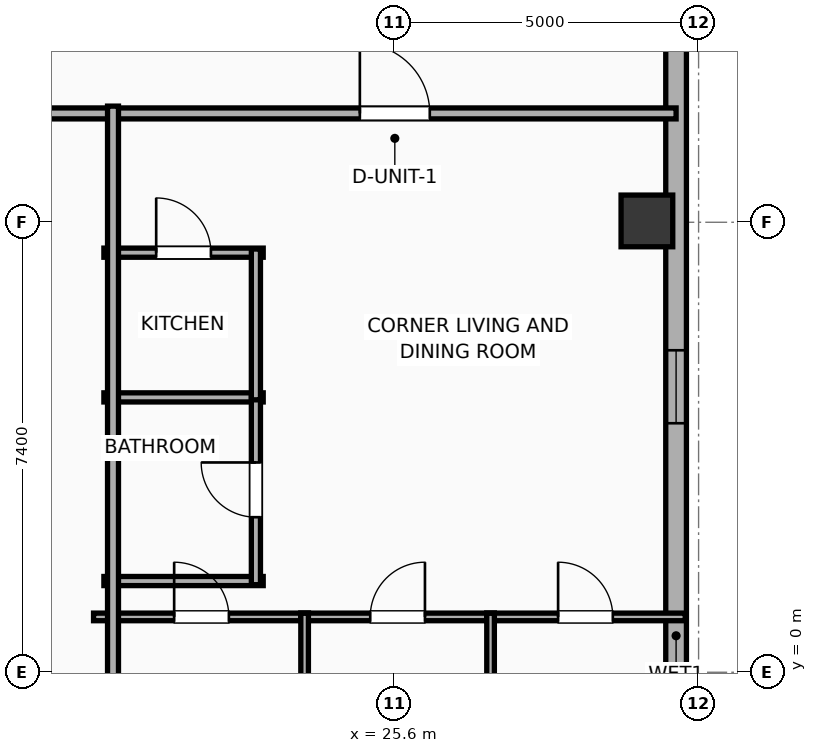
"""IFC4 building model, lengths in metres.
Left out: names, types, materials, properties, quantities, classifications, styles, units other than length and angle.
Written with IfcOpenShell. Run it as: python <this file> out.ifc"""

import sys

from ifc_helpers import new_model, si_unit, direction, frame, frame_2d, origin, origin_2d, place, context, subcontext, project, spatial, rectangle, hollow_rectangle, extrude, element, fill, save


model = new_model("IFC4")
c1 = context("Model", 3, precision=1e-05, world=origin(), true_north=direction((0.0, 1.0)))
c2 = subcontext(c1, "Body", "Model", "MODEL_VIEW")
j1 = project(units=[si_unit("LENGTHUNIT", "METRE"), si_unit("PLANEANGLEUNIT", "RADIAN")], contexts=[c1])
p1 = place(None, origin())
s1 = spatial("IfcSite", under=j1, at=p1, CompositionType="ELEMENT")
p2 = place(p1, origin())
s2 = spatial("IfcBuilding", under=s1, at=p2, CompositionType="ELEMENT")
p3 = place(p2, frame((0.0, 0.0, 223.6)))
s3 = spatial("IfcBuildingStorey", under=s2, at=p3, CompositionType="ELEMENT", Elevation=223.6)
p4 = place(p3, frame((29.75, 7.422, 0.0), z_axis=(0.0, 0.0, 1.0), x_axis=(1.0, 0.0, 0.0)))
e1 = element("IfcColumn", 1, at=p4, inside=s3, PredefinedType="COLUMN", context=c2, shape_type="SweptSolid", body=[
    extrude(hollow_rectangle(XDim=0.85, YDim=0.85, WallThickness=0.028, at=origin_2d()), origin(), (0.0, 0.0, 1.0), 3.9),
])
p5 = place(p3, frame((30.23, 16.583, 0.0), z_axis=(0.0, 0.0, 1.0), x_axis=(0.0, -1.0, 0.0)))
e2 = element("IfcWall", 2, at=p5, inside=s3, PredefinedType="ELEMENTEDWALL", context=c2, shape_type="SweptSolid", body=[
    extrude(rectangle(XDim=31.967, YDim=0.34, at=frame_2d((15.983, 0.0))), origin(), (0.0, 0.0, 1.0), 3.65),
])
p6 = place(p5, frame((30.132, 0.0, 0.75)))
e3 = element("IfcOpeningElement", 3, at=p6, cuts=e2, PredefinedType="OPENING", context=c2, shape_type="SweptSolid", body=[
    extrude(rectangle(XDim=1.2, YDim=2.05, at=frame_2d((0.6, 1.025))), frame((0.0, 0.18, 0.0), z_axis=(0.0, -1.0, 0.0), x_axis=(1.0, 0.0, 0.0)), (0.0, 0.0, 1.0), 0.36),
])
p7 = place(p5, frame((11.288, 0.0, 0.75)))
e4 = element("IfcOpeningElement", 4, at=p7, cuts=e2, PredefinedType="OPENING", context=c2, shape_type="SweptSolid", body=[
    extrude(rectangle(XDim=1.2, YDim=2.05, at=frame_2d((0.6, 1.025))), frame((0.0, 0.18, 0.0), z_axis=(0.0, -1.0, 0.0), x_axis=(1.0, 0.0, 0.0)), (0.0, 0.0, 1.0), 0.36),
])
p8 = place(p5, frame((20.538, 0.0, 0.75)))
e5 = element("IfcOpeningElement", 5, at=p8, cuts=e2, PredefinedType="OPENING", context=c2, shape_type="SweptSolid", body=[
    extrude(rectangle(XDim=1.2, YDim=2.05, at=frame_2d((0.6, 1.025))), frame((0.0, 0.18, 0.0), z_axis=(0.0, -1.0, 0.0), x_axis=(1.0, 0.0, 0.0)), (0.0, 0.0, 1.0), 0.36),
])
p9 = place(p3, frame((9.88, 9.19, 0.0), z_axis=(0.0, 0.0, 1.0), x_axis=(1.0, 0.0, 0.0)))
e6 = element("IfcWall", 6, at=p9, inside=s3, PredefinedType="PARTITIONING", context=c2, shape_type="SweptSolid", body=[
    extrude(rectangle(XDim=20.35, YDim=0.18, at=frame_2d((10.175, 0.0))), origin(), (0.0, 0.0, 1.0), 3.65),
])
p10 = place(p9, frame((15.149, 0.0, 0.0)))
e7 = element("IfcOpeningElement", 7, at=p10, cuts=e6, PredefinedType="OPENING", context=c2, shape_type="SweptSolid", body=[
    extrude(rectangle(XDim=1.15, YDim=2.05, at=frame_2d((0.575, 1.025))), frame((0.0, 0.1, 0.0), z_axis=(0.0, -1.0, 0.0), x_axis=(1.0, 0.0, 0.0)), (0.0, 0.0, 1.0), 0.2),
])
p11 = place(p3, frame((20.82, 6.9, 0.0), z_axis=(0.0, 0.0, 1.0), x_axis=(1.0, 0.0, 0.0)))
e8 = element("IfcWall", 8, at=p11, inside=s3, PredefinedType="PLUMBINGWALL", context=c2, shape_type="SweptSolid", body=[
    extrude(rectangle(XDim=2.62, YDim=0.15, at=frame_2d((1.31, 0.0))), origin(), (0.0, 0.0, 1.0), 3.65),
])
p12 = place(p11, frame((0.86, 0.0, 0.0)))
e9 = element("IfcOpeningElement", 9, at=p12, cuts=e8, PredefinedType="OPENING", context=c2, shape_type="SweptSolid", body=[
    extrude(rectangle(XDim=0.9, YDim=2.05, at=frame_2d((0.45, 1.025))), frame((0.0, 0.085, 0.0), z_axis=(0.0, -1.0, 0.0), x_axis=(1.0, 0.0, 0.0)), (0.0, 0.0, 1.0), 0.17),
])
for number, where, z_axis, x_axis in (
    (10, (20.82, 4.52, 0.0), (0.0, 0.0, 1.0), (1.0, 0.0, 0.0)),
    (11, (20.82, 1.5, 0.0), (0.0, 0.0, 1.0), (1.0, 0.0, 0.0)),
):
    element("IfcWall", number, at=place(p3, frame(where, z_axis=z_axis, x_axis=x_axis)), inside=s3, PredefinedType="PLUMBINGWALL", context=c2, shape_type="SweptSolid", body=[
        extrude(rectangle(XDim=2.62, YDim=0.15, at=frame_2d((1.31, 0.0))), origin(), (0.0, 0.0, 1.0), 3.65),
    ])
p13 = place(p3, frame((23.32, 1.44, 0.0), z_axis=(0.0, 0.0, 1.0), x_axis=(0.0, 1.0, 0.0)))
e12 = element("IfcWall", 12, at=p13, inside=s3, PredefinedType="PLUMBINGWALL", context=c2, shape_type="SweptSolid", body=[
    extrude(rectangle(XDim=3.12, YDim=0.15, at=frame_2d((1.56, 0.0))), origin(), (0.0, 0.0, 1.0), 3.65),
])
p14 = place(p13, frame((1.11, 0.0, 0.0)))
e13 = element("IfcOpeningElement", 13, at=p14, cuts=e12, PredefinedType="OPENING", context=c2, shape_type="SweptSolid", body=[
    extrude(rectangle(XDim=0.9, YDim=2.05, at=frame_2d((0.45, 1.025))), frame((0.0, 0.085, 0.0), z_axis=(0.0, -1.0, 0.0), x_axis=(1.0, 0.0, 0.0)), (0.0, 0.0, 1.0), 0.17),
])
p15 = place(p3, frame((23.32, 4.48, 0.0), z_axis=(0.0, 0.0, 1.0), x_axis=(0.0, 1.0, 0.0)))
e14 = element("IfcWall", 14, at=p15, inside=s3, PredefinedType="PLUMBINGWALL", context=c2, shape_type="SweptSolid", body=[
    extrude(rectangle(XDim=2.48, YDim=0.15, at=frame_2d((1.24, 0.0))), origin(), (0.0, 0.0, 1.0), 3.65),
])
p16 = place(p3, frame((20.65, 0.91, 0.0), z_axis=(0.0, 0.0, 1.0), x_axis=(1.0, 0.0, 0.0)))
e15 = element("IfcWall", 15, at=p16, inside=s3, PredefinedType="PARTITIONING", context=c2, shape_type="SweptSolid", body=[
    extrude(rectangle(XDim=3.534, YDim=0.125, at=frame_2d((1.767, 0.0))), origin(), (0.0, 0.0, 1.0), 3.65),
])
p17 = place(p16, frame((1.325, 0.0, 0.0)))
e16 = element("IfcOpeningElement", 16, at=p17, cuts=e15, PredefinedType="OPENING", context=c2, shape_type="SweptSolid", body=[
    extrude(rectangle(XDim=0.9, YDim=2.05, at=frame_2d((0.45, 1.025))), frame((0.0, 0.073, 0.0), z_axis=(0.0, -1.0, 0.0), x_axis=(1.0, 0.0, 0.0)), (0.0, 0.0, 1.0), 0.145),
])
p18 = place(p3, frame((24.059, 0.91, 0.0), z_axis=(0.0, 0.0, 1.0), x_axis=(1.0, 0.0, 0.0)))
e17 = element("IfcWall", 17, at=p18, inside=s3, PredefinedType="PARTITIONING", context=c2, shape_type="SweptSolid", body=[
    extrude(rectangle(XDim=3.183, YDim=0.125, at=frame_2d((1.591, 0.0))), origin(), (0.0, 0.0, 1.0), 3.65),
])
p19 = place(p18, frame((1.142, 0.0, 0.0)))
e18 = element("IfcOpeningElement", 18, at=p19, cuts=e17, PredefinedType="OPENING", context=c2, shape_type="SweptSolid", body=[
    extrude(rectangle(XDim=0.9, YDim=2.05, at=frame_2d((0.45, 1.025))), frame((0.0, 0.073, 0.0), z_axis=(0.0, -1.0, 0.0), x_axis=(1.0, 0.0, 0.0)), (0.0, 0.0, 1.0), 0.145),
])
p20 = place(p3, frame((27.116, 0.91, 0.0), z_axis=(0.0, 0.0, 1.0), x_axis=(1.0, 0.0, 0.0)))
e19 = element("IfcWall", 19, at=p20, inside=s3, PredefinedType="PARTITIONING", context=c2, shape_type="SweptSolid", body=[
    extrude(rectangle(XDim=3.263, YDim=0.125, at=frame_2d((1.632, 0.0))), origin(), (0.0, 0.0, 1.0), 3.65),
])
p21 = place(p20, frame((1.173, 0.0, 0.0)))
e20 = element("IfcOpeningElement", 20, at=p21, cuts=e19, PredefinedType="OPENING", context=c2, shape_type="SweptSolid", body=[
    extrude(rectangle(XDim=0.9, YDim=2.05, at=frame_2d((0.45, 1.025))), frame((0.0, 0.073, 0.0), z_axis=(0.0, -1.0, 0.0), x_axis=(1.0, 0.0, 0.0)), (0.0, 0.0, 1.0), 0.145),
])
for number, where, z_axis, x_axis in (
    (21, (27.179, -9.51, 0.0), (0.0, 0.0, 1.0), (0.0, 1.0, 0.0)),
    (22, (24.121, -9.51, 0.0), (0.0, 0.0, 1.0), (0.0, 1.0, 0.0)),
):
    element("IfcWall", number, at=place(p3, frame(where, z_axis=z_axis, x_axis=x_axis)), inside=s3, PredefinedType="PARTITIONING", context=c2, shape_type="SweptSolid", body=[
        extrude(rectangle(XDim=10.48, YDim=0.125, at=frame_2d((5.24, 0.0))), origin(), (0.0, 0.0, 1.0), 3.65),
    ])
p22 = place(p3, frame((20.97, -9.31, 0.0), z_axis=(0.0, 0.0, 1.0), x_axis=(0.0, 1.0, 0.0)))
e23 = element("IfcWall", 23, at=p22, inside=s3, PredefinedType="PARTITIONING", context=c2, shape_type="SweptSolid", body=[
    extrude(rectangle(XDim=18.62, YDim=0.18, at=frame_2d((9.31, 0.0))), origin(), (0.0, 0.0, 1.0), 3.65),
])
p23 = place(p7, origin())
e24 = element("IfcWindow", 24, at=p23, inside=s3, PartitioningType="SINGLE_PANEL", PredefinedType="WINDOW", context=c2, shape_type="SweptSolid", body=[
    extrude(rectangle(XDim=1.2, YDim=2.05, at=frame_2d((0.6, 1.025))), frame((0.0, 0.03, 0.0), z_axis=(0.0, -1.0, 0.0), x_axis=(1.0, 0.0, 0.0)), (0.0, 0.0, 1.0), 0.06),
])
fill(e4, e24)
p24 = place(p10, origin())
e25 = element("IfcDoor", 25, at=p24, inside=s3, OperationType="SINGLE_SWING_LEFT", PredefinedType="DOOR", context=c2, shape_type="SweptSolid", body=[
    extrude(rectangle(XDim=1.15, YDim=2.05, at=frame_2d((0.575, 1.025))), frame((0.0, 0.025, 0.0), z_axis=(0.0, -1.0, 0.0), x_axis=(1.0, 0.0, 0.0)), (0.0, 0.0, 1.0), 0.05),
])
fill(e7, e25)
p25 = place(p12, origin())
e26 = element("IfcDoor", 26, at=p25, inside=s3, OperationType="SINGLE_SWING_LEFT", PredefinedType="DOOR", context=c2, shape_type="SweptSolid", body=[
    extrude(rectangle(XDim=0.9, YDim=2.05, at=frame_2d((0.45, 1.025))), frame((0.0, 0.025, 0.0), z_axis=(0.0, -1.0, 0.0), x_axis=(1.0, 0.0, 0.0)), (0.0, 0.0, 1.0), 0.05),
])
fill(e9, e26)
p26 = place(p14, origin())
e27 = element("IfcDoor", 27, at=p26, inside=s3, OperationType="SINGLE_SWING_RIGHT", PredefinedType="DOOR", context=c2, shape_type="SweptSolid", body=[
    extrude(rectangle(XDim=0.9, YDim=2.05, at=frame_2d((0.45, 1.025))), frame((0.0, 0.025, 0.0), z_axis=(0.0, -1.0, 0.0), x_axis=(1.0, 0.0, 0.0)), (0.0, 0.0, 1.0), 0.05),
])
fill(e13, e27)
p27 = place(p17, origin())
e28 = element("IfcDoor", 28, at=p27, inside=s3, OperationType="SINGLE_SWING_LEFT", PredefinedType="DOOR", context=c2, shape_type="SweptSolid", body=[
    extrude(rectangle(XDim=0.9, YDim=2.05, at=frame_2d((0.45, 1.025))), frame((0.0, 0.025, 0.0), z_axis=(0.0, -1.0, 0.0), x_axis=(1.0, 0.0, 0.0)), (0.0, 0.0, 1.0), 0.05),
])
fill(e16, e28)
p28 = place(p19, origin())
e29 = element("IfcDoor", 29, at=p28, inside=s3, OperationType="SINGLE_SWING_RIGHT", PredefinedType="DOOR", context=c2, shape_type="SweptSolid", body=[
    extrude(rectangle(XDim=0.9, YDim=2.05, at=frame_2d((0.45, 1.025))), frame((0.0, 0.025, 0.0), z_axis=(0.0, -1.0, 0.0), x_axis=(1.0, 0.0, 0.0)), (0.0, 0.0, 1.0), 0.05),
])
fill(e18, e29)
p29 = place(p21, origin())
e30 = element("IfcDoor", 30, at=p29, inside=s3, OperationType="SINGLE_SWING_LEFT", PredefinedType="DOOR", context=c2, shape_type="SweptSolid", body=[
    extrude(rectangle(XDim=0.9, YDim=2.05, at=frame_2d((0.45, 1.025))), frame((0.0, 0.025, 0.0), z_axis=(0.0, -1.0, 0.0), x_axis=(1.0, 0.0, 0.0)), (0.0, 0.0, 1.0), 0.05),
])
fill(e20, e30)
save(model, sys.argv[1])
